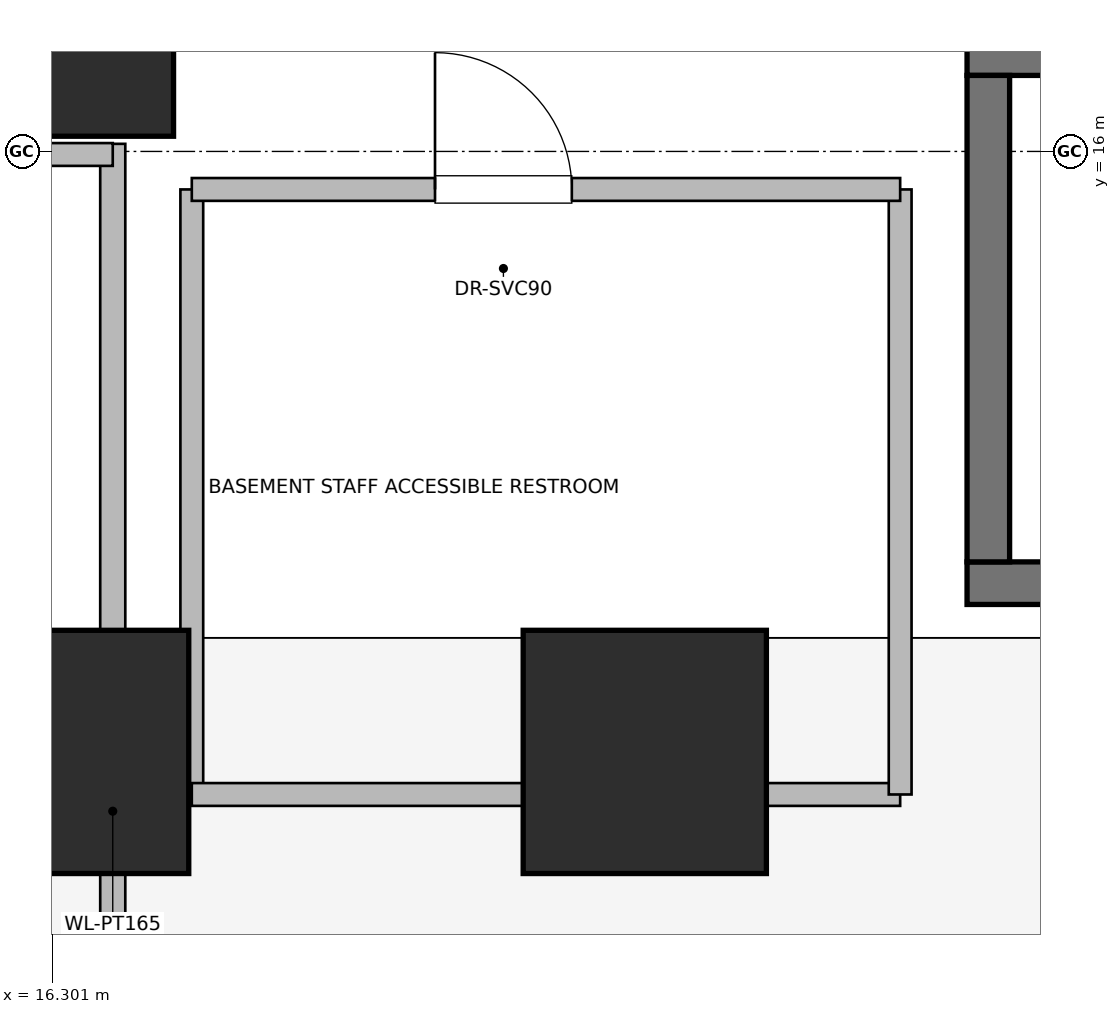
"""IFC4 building model, lengths in metres.
Left out: names, types, materials, properties, quantities, classifications, styles, units other than length and angle.
Written with IfcOpenShell. Run it as: python <this file> out.ifc"""

import sys

from ifc_helpers import new_model, si_unit, direction, frame, frame_2d, origin, origin_2d, place, context, subcontext, project, spatial, rectangle, extrude, element, fill, save


model = new_model("IFC4")
c1 = context("Model", 3, precision=1e-05, world=origin(), true_north=direction((0.0, 1.0)))
c2 = subcontext(c1, "Body", "Model", "MODEL_VIEW")
j1 = project(units=[si_unit("LENGTHUNIT", "METRE"), si_unit("PLANEANGLEUNIT", "RADIAN")], contexts=[c1])
p1 = place(None, origin())
s1 = spatial("IfcSite", under=j1, at=p1, CompositionType="ELEMENT")
p2 = place(p1, origin())
s2 = spatial("IfcBuilding", under=s1, at=p2, CompositionType="ELEMENT")
p3 = place(p2, frame((0.0, 0.0, -10.2)))
s3 = spatial("IfcBuildingStorey", under=s2, at=p3, CompositionType="ELEMENT", Elevation=-10.2)
p4 = place(p3, frame((22.32, 13.16, 0.0), z_axis=(0.0, 0.0, 1.0), x_axis=(1.0, 0.0, 0.0)))
e1 = element("IfcWall", 1, at=p4, inside=s3, PredefinedType="SHEAR", context=c2, shape_type="SweptSolid", body=[
    extrude(rectangle(XDim=8.36, YDim=0.28, at=frame_2d((4.18, 0.0))), origin(), (0.0, 0.0, 1.0), 5.4),
])
p5 = place(p3, frame((30.68, 16.64, 0.0), z_axis=(0.0, 0.0, 1.0), x_axis=(-1.0, 0.0, 0.0)))
e2 = element("IfcWall", 2, at=p5, inside=s3, PredefinedType="SHEAR", context=c2, shape_type="SweptSolid", body=[
    extrude(rectangle(XDim=8.36, YDim=0.28, at=frame_2d((4.18, 0.0))), origin(), (0.0, 0.0, 1.0), 5.4),
])
p6 = place(p5, frame((6.08, 0.0, 0.0)))
e3 = element("IfcOpeningElement", 3, at=p6, cuts=e2, PredefinedType="OPENING", context=c2, shape_type="SweptSolid", body=[
    extrude(rectangle(XDim=1.05, YDim=2.0, at=frame_2d((0.525, 1.0))), frame((0.0, 0.15, 0.0), z_axis=(0.0, -1.0, 0.0), x_axis=(1.0, 0.0, 0.0)), (0.0, 0.0, 1.0), 0.3),
])
p7 = place(p3, frame((22.46, 16.5, 0.0), z_axis=(0.0, 0.0, 1.0), x_axis=(0.0, -1.0, 0.0)))
e4 = element("IfcWall", 4, at=p7, inside=s3, PredefinedType="SHEAR", context=c2, shape_type="SweptSolid", body=[
    extrude(rectangle(XDim=3.2, YDim=0.28, at=frame_2d((1.6, 0.0))), origin(), (0.0, 0.0, 1.0), 5.4),
])
for number, where, z_axis, x_axis in (
    (5, (16.3, 16.9, 0.0), (0.0, 0.0, 1.0), (1.0, 0.0, 0.0)),
    (6, (20.2, 12.05, 0.0), (0.0, 0.0, 1.0), (1.0, 0.0, 0.0)),
    (7, (16.4, 12.05, 0.0), (0.0, 0.0, 1.0), (1.0, 0.0, 0.0)),
):
    element("IfcColumn", number, at=place(p3, frame(where, z_axis=z_axis, x_axis=x_axis)), inside=s3, PredefinedType="COLUMN", context=c2, shape_type="SweptSolid", body=[
        extrude(rectangle(XDim=1.6, YDim=1.6, at=origin_2d()), origin(), (0.0, 0.0, 1.0), 5.4),
    ])
p8 = place(p3, frame((17.22, 15.75, 0.0), z_axis=(0.0, 0.0, 1.0), x_axis=(0.0, -1.0, 0.0)))
e8 = element("IfcWall", 8, at=p8, inside=s3, PredefinedType="PARTITIONING", context=c2, shape_type="SweptSolid", body=[
    extrude(rectangle(XDim=3.98, YDim=0.15, at=frame_2d((1.99, 0.0))), origin(), (0.0, 0.0, 1.0), 5.09),
])
p9 = place(p3, frame((17.22, 11.77, 0.0), z_axis=(0.0, 0.0, 1.0), x_axis=(1.0, 0.0, 0.0)))
e9 = element("IfcWall", 9, at=p9, inside=s3, PredefinedType="PARTITIONING", context=c2, shape_type="SweptSolid", body=[
    extrude(rectangle(XDim=4.66, YDim=0.15, at=frame_2d((2.33, 0.0))), origin(), (0.0, 0.0, 1.0), 4.142),
])
p10 = place(p3, frame((21.88, 11.77, 0.0), z_axis=(0.0, 0.0, 1.0), x_axis=(0.0, 1.0, 0.0)))
e10 = element("IfcWall", 10, at=p10, inside=s3, PredefinedType="PARTITIONING", context=c2, shape_type="SweptSolid", body=[
    extrude(rectangle(XDim=3.98, YDim=0.15, at=frame_2d((1.99, 0.0))), origin(), (0.0, 0.0, 1.0), 5.09),
])
p11 = place(p3, frame((17.22, 15.75, 0.0), z_axis=(0.0, 0.0, 1.0), x_axis=(1.0, 0.0, 0.0)))
e11 = element("IfcWall", 11, at=p11, inside=s3, PredefinedType="PARTITIONING", context=c2, shape_type="SweptSolid", body=[
    extrude(rectangle(XDim=4.66, YDim=0.15, at=frame_2d((2.33, 0.0))), origin(), (0.0, 0.0, 1.0), 5.09),
])
p12 = place(p11, frame((1.6, 0.0, 0.0)))
e12 = element("IfcOpeningElement", 12, at=p12, cuts=e11, PredefinedType="OPENING", context=c2, shape_type="SweptSolid", body=[
    extrude(rectangle(XDim=0.9, YDim=2.0, at=frame_2d((0.45, 1.0))), frame((0.0, 0.085, 0.0), z_axis=(0.0, -1.0, 0.0), x_axis=(1.0, 0.0, 0.0)), (0.0, 0.0, 1.0), 0.17),
])
p13 = place(p3, frame((16.7, 0.495, 0.0), z_axis=(0.0, 0.0, 1.0), x_axis=(0.0, 1.0, 0.0)))
e13 = element("IfcWall", 13, at=p13, inside=s3, PredefinedType="PARTITIONING", context=c2, shape_type="SweptSolid", body=[
    extrude(rectangle(XDim=15.555, YDim=0.165, at=frame_2d((7.777, 0.0))), origin(), (0.0, 0.0, 1.0), 4.163),
])
p14 = place(p3, frame((9.094, 15.98, 0.0), z_axis=(0.0, 0.0, 1.0), x_axis=(1.0, 0.0, 0.0)))
e14 = element("IfcWall", 14, at=p14, inside=s3, PredefinedType="PARTITIONING", context=c2, shape_type="SweptSolid", body=[
    extrude(rectangle(XDim=7.606, YDim=0.15, at=frame_2d((3.803, 0.0))), origin(), (0.0, 0.0, 1.0), 5.09),
])
p15 = place(p14, frame((3.323, 0.0, 0.0)))
e15 = element("IfcOpeningElement", 15, at=p15, cuts=e14, PredefinedType="OPENING", context=c2, shape_type="SweptSolid", body=[
    extrude(rectangle(XDim=0.96, YDim=2.0, at=frame_2d((0.48, 1.0))), frame((0.0, 0.085, 0.0), z_axis=(0.0, -1.0, 0.0), x_axis=(1.0, 0.0, 0.0)), (0.0, 0.0, 1.0), 0.17),
])
p16 = place(p12, origin())
e16 = element("IfcDoor", 16, at=p16, inside=s3, OperationType="SINGLE_SWING_LEFT", PredefinedType="DOOR", context=c2, shape_type="SweptSolid", body=[
    extrude(rectangle(XDim=0.9, YDim=2.0, at=frame_2d((0.45, 1.0))), frame((0.0, 0.025, 0.0), z_axis=(0.0, -1.0, 0.0), x_axis=(1.0, 0.0, 0.0)), (0.0, 0.0, 1.0), 0.05),
])
fill(e12, e16)
save(model, sys.argv[1])
